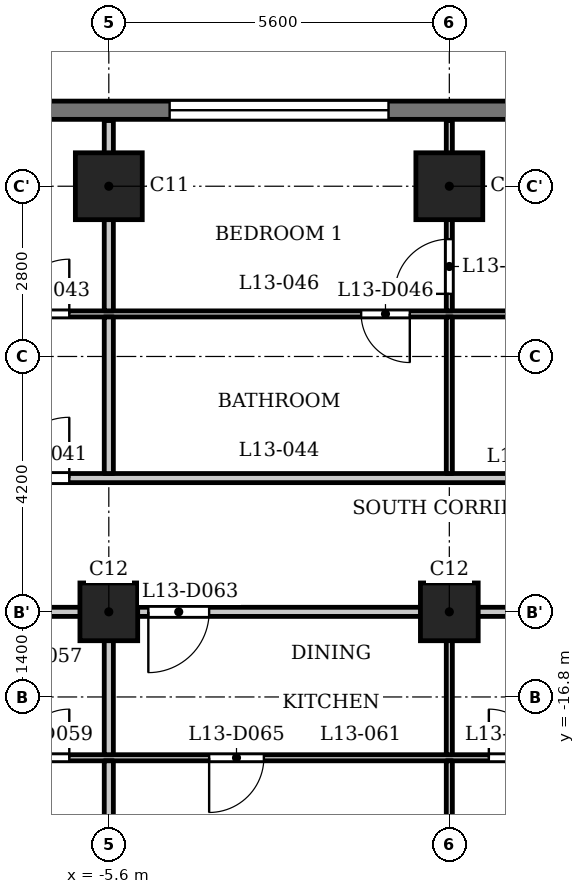
"""IFC4 building model, lengths in metres.
Left out: names, types, materials, properties, quantities, classifications, styles, units other than length and angle.
Written with IfcOpenShell. Run it as: python <this file> out.ifc"""

import sys

from ifc_helpers import new_model, si_unit, direction, frame, frame_2d, origin, origin_2d, place, context, subcontext, project, spatial, rectangle, extrude, element, fill, save


model = new_model("IFC4")
c1 = context("Model", 3, precision=1e-05, world=origin(), true_north=direction((0.0, 1.0)))
c2 = subcontext(c1, "Body", "Model", "MODEL_VIEW")
j1 = project(units=[si_unit("LENGTHUNIT", "METRE"), si_unit("PLANEANGLEUNIT", "RADIAN")], contexts=[c1])
p1 = place(None, origin())
s1 = spatial("IfcSite", under=j1, at=p1, CompositionType="ELEMENT")
p2 = place(p1, origin())
s2 = spatial("IfcBuilding", under=s1, at=p2, CompositionType="ELEMENT")
p3 = place(p2, frame((0.0, 0.0, 55.0)))
s3 = spatial("IfcBuildingStorey", under=s2, at=p3, CompositionType="ELEMENT", Elevation=55.0)
for number, where, z_axis, x_axis in (
    (1, (-5.6, -8.4, 0.0), (0.0, 0.0, 1.0), (1.0, 0.0, 0.0)),
    (2, (0.0, -8.4, 0.0), (0.0, 0.0, 1.0), (1.0, 0.0, 0.0)),
):
    element("IfcColumn", number, at=place(p3, frame(where, z_axis=z_axis, x_axis=x_axis)), inside=s3, PredefinedType="COLUMN", context=c2, shape_type="SweptSolid", body=[
        extrude(rectangle(XDim=1.1, YDim=1.1, at=origin_2d()), origin(), (0.0, 0.0, 1.0), 3.5),
    ])
for number, where, z_axis, x_axis in (
    (3, (-5.6, -15.4, 0.0), (0.0, 0.0, 1.0), (1.0, 0.0, 0.0)),
    (4, (0.0, -15.4, 0.0), (0.0, 0.0, 1.0), (1.0, 0.0, 0.0)),
):
    element("IfcColumn", number, at=place(p3, frame(where, z_axis=z_axis, x_axis=x_axis)), inside=s3, PredefinedType="COLUMN", context=c2, shape_type="SweptSolid", body=[
        extrude(rectangle(XDim=0.95, YDim=0.95, at=origin_2d()), origin(), (0.0, 0.0, 1.0), 3.5),
    ])
p4 = place(p3, frame((13.8, -7.15, 0.0), z_axis=(0.0, 0.0, 1.0), x_axis=(-1.0, 0.0, 0.0)))
e5 = element("IfcWall", 5, at=p4, inside=s3, PredefinedType="SOLIDWALL", context=c2, shape_type="SweptSolid", body=[
    extrude(rectangle(XDim=27.6, YDim=0.3, at=frame_2d((13.8, 0.0))), origin(), (0.0, 0.0, 1.0), 3.2),
])
p5 = place(p4, frame((0.363, 0.0, 0.9)))
e6 = element("IfcOpeningElement", 6, at=p5, cuts=e5, PredefinedType="OPENING", context=c2, shape_type="SweptSolid", body=[
    extrude(rectangle(XDim=1.8, YDim=1.25, at=frame_2d((0.9, 0.625))), frame((0.0, 0.16, 0.0), z_axis=(0.0, -1.0, 0.0), x_axis=(1.0, 0.0, 0.0)), (0.0, 0.0, 1.0), 0.32),
])
p6 = place(p4, frame((3.6, 0.0, 1.2)))
e7 = element("IfcOpeningElement", 7, at=p6, cuts=e5, PredefinedType="OPENING", context=c2, shape_type="SweptSolid", body=[
    extrude(rectangle(XDim=3.6, YDim=0.95, at=frame_2d((1.8, 0.475))), frame((0.0, 0.16, 0.0), z_axis=(0.0, -1.0, 0.0), x_axis=(1.0, 0.0, 0.0)), (0.0, 0.0, 1.0), 0.32),
])
p7 = place(p4, frame((9.2, 0.0, 1.2)))
e8 = element("IfcOpeningElement", 8, at=p7, cuts=e5, PredefinedType="OPENING", context=c2, shape_type="SweptSolid", body=[
    extrude(rectangle(XDim=3.6, YDim=0.95, at=frame_2d((1.8, 0.475))), frame((0.0, 0.16, 0.0), z_axis=(0.0, -1.0, 0.0), x_axis=(1.0, 0.0, 0.0)), (0.0, 0.0, 1.0), 0.32),
])
p8 = place(p4, frame((14.8, 0.0, 1.2)))
e9 = element("IfcOpeningElement", 9, at=p8, cuts=e5, PredefinedType="OPENING", context=c2, shape_type="SweptSolid", body=[
    extrude(rectangle(XDim=3.6, YDim=0.95, at=frame_2d((1.8, 0.475))), frame((0.0, 0.16, 0.0), z_axis=(0.0, -1.0, 0.0), x_axis=(1.0, 0.0, 0.0)), (0.0, 0.0, 1.0), 0.32),
])
p9 = place(p4, frame((20.4, 0.0, 1.2)))
e10 = element("IfcOpeningElement", 10, at=p9, cuts=e5, PredefinedType="OPENING", context=c2, shape_type="SweptSolid", body=[
    extrude(rectangle(XDim=3.6, YDim=0.95, at=frame_2d((1.8, 0.475))), frame((0.0, 0.16, 0.0), z_axis=(0.0, -1.0, 0.0), x_axis=(1.0, 0.0, 0.0)), (0.0, 0.0, 1.0), 0.32),
])
p10 = place(p4, frame((25.438, 0.0, 0.9)))
e11 = element("IfcOpeningElement", 11, at=p10, cuts=e5, PredefinedType="OPENING", context=c2, shape_type="SweptSolid", body=[
    extrude(rectangle(XDim=1.8, YDim=1.25, at=frame_2d((0.9, 0.625))), frame((0.0, 0.16, 0.0), z_axis=(0.0, -1.0, 0.0), x_axis=(1.0, 0.0, 0.0)), (0.0, 0.0, 1.0), 0.32),
])
p11 = place(p3, frame((-26.394, -17.8, 0.0), z_axis=(0.0, 0.0, 1.0), x_axis=(1.0, 0.0, 0.0)))
e12 = element("IfcWall", 12, at=p11, inside=s3, PredefinedType="PARTITIONING", context=c2, shape_type="SweptSolid", body=[
    extrude(rectangle(XDim=53.034, YDim=0.1, at=frame_2d((26.517, 0.0))), origin(), (0.0, 0.0, 1.0), 3.2),
])
p12 = place(p11, frame((0.794, 0.0, 0.0)))
e13 = element("IfcOpeningElement", 13, at=p12, cuts=e12, PredefinedType="OPENING", context=c2, shape_type="SweptSolid", body=[
    extrude(rectangle(XDim=0.8, YDim=2.1, at=frame_2d((0.4, 1.05))), frame((0.0, 0.06, 0.0), z_axis=(0.0, -1.0, 0.0), x_axis=(1.0, 0.0, 0.0)), (0.0, 0.0, 1.0), 0.12),
])
p13 = place(p11, frame((5.644, 0.0, 0.0)))
e14 = element("IfcOpeningElement", 14, at=p13, cuts=e12, PredefinedType="OPENING", context=c2, shape_type="SweptSolid", body=[
    extrude(rectangle(XDim=0.9, YDim=2.1, at=frame_2d((0.45, 1.05))), frame((0.0, 0.06, 0.0), z_axis=(0.0, -1.0, 0.0), x_axis=(1.0, 0.0, 0.0)), (0.0, 0.0, 1.0), 0.12),
])
p14 = place(p11, frame((19.344, 0.0, 0.0)))
e15 = element("IfcOpeningElement", 15, at=p14, cuts=e12, PredefinedType="OPENING", context=c2, shape_type="SweptSolid", body=[
    extrude(rectangle(XDim=0.8, YDim=2.1, at=frame_2d((0.4, 1.05))), frame((0.0, 0.06, 0.0), z_axis=(0.0, -1.0, 0.0), x_axis=(1.0, 0.0, 0.0)), (0.0, 0.0, 1.0), 0.12),
])
p15 = place(p11, frame((17.094, 0.0, 0.0)))
e16 = element("IfcOpeningElement", 16, at=p15, cuts=e12, PredefinedType="OPENING", context=c2, shape_type="SweptSolid", body=[
    extrude(rectangle(XDim=0.9, YDim=2.1, at=frame_2d((0.45, 1.05))), frame((0.0, 0.06, 0.0), z_axis=(0.0, -1.0, 0.0), x_axis=(1.0, 0.0, 0.0)), (0.0, 0.0, 1.0), 0.12),
])
p16 = place(p11, frame((10.494, 0.0, 0.0)))
e17 = element("IfcOpeningElement", 17, at=p16, cuts=e12, PredefinedType="OPENING", context=c2, shape_type="SweptSolid", body=[
    extrude(rectangle(XDim=0.9, YDim=2.1, at=frame_2d((0.45, 1.05))), frame((0.0, 0.06, 0.0), z_axis=(0.0, -1.0, 0.0), x_axis=(1.0, 0.0, 0.0)), (0.0, 0.0, 1.0), 0.12),
])
p17 = place(p11, frame((13.294, 0.0, 0.0)))
e18 = element("IfcOpeningElement", 18, at=p17, cuts=e12, PredefinedType="OPENING", context=c2, shape_type="SweptSolid", body=[
    extrude(rectangle(XDim=0.9, YDim=2.1, at=frame_2d((0.45, 1.05))), frame((0.0, 0.06, 0.0), z_axis=(0.0, -1.0, 0.0), x_axis=(1.0, 0.0, 0.0)), (0.0, 0.0, 1.0), 0.12),
])
p18 = place(p11, frame((27.044, 0.0, 0.0)))
e19 = element("IfcOpeningElement", 19, at=p18, cuts=e12, PredefinedType="OPENING", context=c2, shape_type="SweptSolid", body=[
    extrude(rectangle(XDim=0.8, YDim=2.1, at=frame_2d((0.4, 1.05))), frame((0.0, 0.06, 0.0), z_axis=(0.0, -1.0, 0.0), x_axis=(1.0, 0.0, 0.0)), (0.0, 0.0, 1.0), 0.12),
])
p19 = place(p11, frame((22.444, 0.0, 0.0)))
e20 = element("IfcOpeningElement", 20, at=p19, cuts=e12, PredefinedType="OPENING", context=c2, shape_type="SweptSolid", body=[
    extrude(rectangle(XDim=0.9, YDim=2.1, at=frame_2d((0.45, 1.05))), frame((0.0, 0.06, 0.0), z_axis=(0.0, -1.0, 0.0), x_axis=(1.0, 0.0, 0.0)), (0.0, 0.0, 1.0), 0.12),
])
p20 = place(p11, frame((36.144, 0.0, 0.0)))
e21 = element("IfcOpeningElement", 21, at=p20, cuts=e12, PredefinedType="OPENING", context=c2, shape_type="SweptSolid", body=[
    extrude(rectangle(XDim=0.8, YDim=2.1, at=frame_2d((0.4, 1.05))), frame((0.0, 0.06, 0.0), z_axis=(0.0, -1.0, 0.0), x_axis=(1.0, 0.0, 0.0)), (0.0, 0.0, 1.0), 0.12),
])
p21 = place(p11, frame((33.644, 0.0, 0.0)))
e22 = element("IfcOpeningElement", 22, at=p21, cuts=e12, PredefinedType="OPENING", context=c2, shape_type="SweptSolid", body=[
    extrude(rectangle(XDim=0.9, YDim=2.1, at=frame_2d((0.45, 1.05))), frame((0.0, 0.06, 0.0), z_axis=(0.0, -1.0, 0.0), x_axis=(1.0, 0.0, 0.0)), (0.0, 0.0, 1.0), 0.12),
])
p22 = place(p11, frame((39.144, 0.0, 0.0)))
e23 = element("IfcOpeningElement", 23, at=p22, cuts=e12, PredefinedType="OPENING", context=c2, shape_type="SweptSolid", body=[
    extrude(rectangle(XDim=0.8, YDim=2.1, at=frame_2d((0.4, 1.05))), frame((0.0, 0.06, 0.0), z_axis=(0.0, -1.0, 0.0), x_axis=(1.0, 0.0, 0.0)), (0.0, 0.0, 1.0), 0.12),
])
p23 = place(p11, frame((41.494, 0.0, 0.0)))
e24 = element("IfcOpeningElement", 24, at=p23, cuts=e12, PredefinedType="OPENING", context=c2, shape_type="SweptSolid", body=[
    extrude(rectangle(XDim=0.9, YDim=2.1, at=frame_2d((0.45, 1.05))), frame((0.0, 0.06, 0.0), z_axis=(0.0, -1.0, 0.0), x_axis=(1.0, 0.0, 0.0)), (0.0, 0.0, 1.0), 0.12),
])
p24 = place(p11, frame((49.362, 0.0, 0.0)))
e25 = element("IfcOpeningElement", 25, at=p24, cuts=e12, PredefinedType="OPENING", context=c2, shape_type="SweptSolid", body=[
    extrude(rectangle(XDim=0.8, YDim=2.1, at=frame_2d((0.4, 1.05))), frame((0.0, 0.06, 0.0), z_axis=(0.0, -1.0, 0.0), x_axis=(1.0, 0.0, 0.0)), (0.0, 0.0, 1.0), 0.12),
])
p25 = place(p11, frame((45.094, 0.0, 0.0)))
e26 = element("IfcOpeningElement", 26, at=p25, cuts=e12, PredefinedType="OPENING", context=c2, shape_type="SweptSolid", body=[
    extrude(rectangle(XDim=0.9, YDim=2.1, at=frame_2d((0.45, 1.05))), frame((0.0, 0.06, 0.0), z_axis=(0.0, -1.0, 0.0), x_axis=(1.0, 0.0, 0.0)), (0.0, 0.0, 1.0), 0.12),
])
p26 = place(p3, frame((-27.484, -15.4, 0.0), z_axis=(0.0, 0.0, 1.0), x_axis=(1.0, 0.0, 0.0)))
e27 = element("IfcWall", 27, at=p26, inside=s3, PredefinedType="PARTITIONING", context=c2, shape_type="SweptSolid", body=[
    extrude(rectangle(XDim=54.968, YDim=0.15, at=frame_2d((27.484, 0.0))), origin(), (0.0, 0.0, 1.0), 3.2),
])
p27 = place(p26, frame((5.734, 0.0, 0.0)))
e28 = element("IfcOpeningElement", 28, at=p27, cuts=e27, PredefinedType="OPENING", context=c2, shape_type="SweptSolid", body=[
    extrude(rectangle(XDim=1.0, YDim=2.1, at=frame_2d((0.5, 1.05))), frame((0.0, 0.085, 0.0), z_axis=(0.0, -1.0, 0.0), x_axis=(1.0, 0.0, 0.0)), (0.0, 0.0, 1.0), 0.17),
])
p28 = place(p26, frame((11.584, 0.0, 0.0)))
e29 = element("IfcOpeningElement", 29, at=p28, cuts=e27, PredefinedType="OPENING", context=c2, shape_type="SweptSolid", body=[
    extrude(rectangle(XDim=1.0, YDim=2.1, at=frame_2d((0.5, 1.05))), frame((0.0, 0.085, 0.0), z_axis=(0.0, -1.0, 0.0), x_axis=(1.0, 0.0, 0.0)), (0.0, 0.0, 1.0), 0.17),
])
p29 = place(p26, frame((22.534, 0.0, 0.0)))
e30 = element("IfcOpeningElement", 30, at=p29, cuts=e27, PredefinedType="OPENING", context=c2, shape_type="SweptSolid", body=[
    extrude(rectangle(XDim=1.0, YDim=2.1, at=frame_2d((0.5, 1.05))), frame((0.0, 0.085, 0.0), z_axis=(0.0, -1.0, 0.0), x_axis=(1.0, 0.0, 0.0)), (0.0, 0.0, 1.0), 0.17),
])
p30 = place(p26, frame((33.734, 0.0, 0.0)))
e31 = element("IfcOpeningElement", 31, at=p30, cuts=e27, PredefinedType="OPENING", context=c2, shape_type="SweptSolid", body=[
    extrude(rectangle(XDim=1.0, YDim=2.1, at=frame_2d((0.5, 1.05))), frame((0.0, 0.085, 0.0), z_axis=(0.0, -1.0, 0.0), x_axis=(1.0, 0.0, 0.0)), (0.0, 0.0, 1.0), 0.17),
])
p31 = place(p26, frame((42.334, 0.0, 0.0)))
e32 = element("IfcOpeningElement", 32, at=p31, cuts=e27, PredefinedType="OPENING", context=c2, shape_type="SweptSolid", body=[
    extrude(rectangle(XDim=1.0, YDim=2.1, at=frame_2d((0.5, 1.05))), frame((0.0, 0.085, 0.0), z_axis=(0.0, -1.0, 0.0), x_axis=(1.0, 0.0, 0.0)), (0.0, 0.0, 1.0), 0.17),
])
p32 = place(p26, frame((45.184, 0.0, 0.0)))
e33 = element("IfcOpeningElement", 33, at=p32, cuts=e27, PredefinedType="OPENING", context=c2, shape_type="SweptSolid", body=[
    extrude(rectangle(XDim=1.0, YDim=2.1, at=frame_2d((0.5, 1.05))), frame((0.0, 0.085, 0.0), z_axis=(0.0, -1.0, 0.0), x_axis=(1.0, 0.0, 0.0)), (0.0, 0.0, 1.0), 0.17),
])
p33 = place(p3, frame((-17.4, -13.2, 0.0), z_axis=(0.0, 0.0, 1.0), x_axis=(1.0, 0.0, 0.0)))
e34 = element("IfcWall", 34, at=p33, inside=s3, PredefinedType="PARTITIONING", context=c2, shape_type="SweptSolid", body=[
    extrude(rectangle(XDim=34.8, YDim=0.15, at=frame_2d((17.4, 0.0))), origin(), (0.0, 0.0, 1.0), 3.2),
])
p34 = place(p33, frame((0.65, 0.0, 0.0)))
e35 = element("IfcOpeningElement", 35, at=p34, cuts=e34, PredefinedType="OPENING", context=c2, shape_type="SweptSolid", body=[
    extrude(rectangle(XDim=1.0, YDim=2.1, at=frame_2d((0.5, 1.05))), frame((0.0, 0.085, 0.0), z_axis=(0.0, -1.0, 0.0), x_axis=(1.0, 0.0, 0.0)), (0.0, 0.0, 1.0), 0.17),
])
p35 = place(p33, frame((33.05, 0.0, 0.0)))
e36 = element("IfcOpeningElement", 36, at=p35, cuts=e34, PredefinedType="OPENING", context=c2, shape_type="SweptSolid", body=[
    extrude(rectangle(XDim=1.0, YDim=2.1, at=frame_2d((0.5, 1.05))), frame((0.0, 0.085, 0.0), z_axis=(0.0, -1.0, 0.0), x_axis=(1.0, 0.0, 0.0)), (0.0, 0.0, 1.0), 0.17),
])
p36 = place(p33, frame((10.15, 0.0, 0.0)))
e37 = element("IfcOpeningElement", 37, at=p36, cuts=e34, PredefinedType="OPENING", context=c2, shape_type="SweptSolid", body=[
    extrude(rectangle(XDim=1.0, YDim=2.1, at=frame_2d((0.5, 1.05))), frame((0.0, 0.085, 0.0), z_axis=(0.0, -1.0, 0.0), x_axis=(1.0, 0.0, 0.0)), (0.0, 0.0, 1.0), 0.17),
])
p37 = place(p33, frame((21.35, 0.0, 0.0)))
e38 = element("IfcOpeningElement", 38, at=p37, cuts=e34, PredefinedType="OPENING", context=c2, shape_type="SweptSolid", body=[
    extrude(rectangle(XDim=1.0, YDim=2.1, at=frame_2d((0.5, 1.05))), frame((0.0, 0.085, 0.0), z_axis=(0.0, -1.0, 0.0), x_axis=(1.0, 0.0, 0.0)), (0.0, 0.0, 1.0), 0.17),
])
p38 = place(p33, frame((30.75, 0.0, 0.0)))
e39 = element("IfcOpeningElement", 39, at=p38, cuts=e34, PredefinedType="OPENING", context=c2, shape_type="SweptSolid", body=[
    extrude(rectangle(XDim=1.0, YDim=2.1, at=frame_2d((0.5, 1.05))), frame((0.0, 0.085, 0.0), z_axis=(0.0, -1.0, 0.0), x_axis=(1.0, 0.0, 0.0)), (0.0, 0.0, 1.0), 0.17),
])
p39 = place(p3, frame((-14.925, -10.5, 0.0), z_axis=(0.0, 0.0, 1.0), x_axis=(1.0, 0.0, 0.0)))
e40 = element("IfcWall", 40, at=p39, inside=s3, PredefinedType="PARTITIONING", context=c2, shape_type="SweptSolid", body=[
    extrude(rectangle(XDim=29.85, YDim=0.1, at=frame_2d((14.925, 0.0))), origin(), (0.0, 0.0, 1.0), 3.2),
])
p40 = place(p39, frame((2.325, 0.0, 0.0)))
e41 = element("IfcOpeningElement", 41, at=p40, cuts=e40, PredefinedType="OPENING", context=c2, shape_type="SweptSolid", body=[
    extrude(rectangle(XDim=0.8, YDim=2.1, at=frame_2d((0.4, 1.05))), frame((0.0, 0.06, 0.0), z_axis=(0.0, -1.0, 0.0), x_axis=(1.0, 0.0, 0.0)), (0.0, 0.0, 1.0), 0.12),
])
p41 = place(p39, frame((7.775, 0.0, 0.0)))
e42 = element("IfcOpeningElement", 42, at=p41, cuts=e40, PredefinedType="OPENING", context=c2, shape_type="SweptSolid", body=[
    extrude(rectangle(XDim=0.9, YDim=2.1, at=frame_2d((0.45, 1.05))), frame((0.0, 0.06, 0.0), z_axis=(0.0, -1.0, 0.0), x_axis=(1.0, 0.0, 0.0)), (0.0, 0.0, 1.0), 0.12),
])
p42 = place(p39, frame((13.475, 0.0, 0.0)))
e43 = element("IfcOpeningElement", 43, at=p42, cuts=e40, PredefinedType="OPENING", context=c2, shape_type="SweptSolid", body=[
    extrude(rectangle(XDim=0.8, YDim=2.1, at=frame_2d((0.4, 1.05))), frame((0.0, 0.06, 0.0), z_axis=(0.0, -1.0, 0.0), x_axis=(1.0, 0.0, 0.0)), (0.0, 0.0, 1.0), 0.12),
])
p43 = place(p39, frame((18.975, 0.0, 0.0)))
e44 = element("IfcOpeningElement", 44, at=p43, cuts=e40, PredefinedType="OPENING", context=c2, shape_type="SweptSolid", body=[
    extrude(rectangle(XDim=0.9, YDim=2.1, at=frame_2d((0.45, 1.05))), frame((0.0, 0.06, 0.0), z_axis=(0.0, -1.0, 0.0), x_axis=(1.0, 0.0, 0.0)), (0.0, 0.0, 1.0), 0.12),
])
p44 = place(p39, frame((24.675, 0.0, 0.0)))
e45 = element("IfcOpeningElement", 45, at=p44, cuts=e40, PredefinedType="OPENING", context=c2, shape_type="SweptSolid", body=[
    extrude(rectangle(XDim=0.8, YDim=2.1, at=frame_2d((0.4, 1.05))), frame((0.0, 0.06, 0.0), z_axis=(0.0, -1.0, 0.0), x_axis=(1.0, 0.0, 0.0)), (0.0, 0.0, 1.0), 0.12),
])
p45 = place(p39, frame((28.375, 0.0, 0.0)))
e46 = element("IfcOpeningElement", 46, at=p45, cuts=e40, PredefinedType="OPENING", context=c2, shape_type="SweptSolid", body=[
    extrude(rectangle(XDim=0.9, YDim=2.1, at=frame_2d((0.45, 1.05))), frame((0.0, 0.06, 0.0), z_axis=(0.0, -1.0, 0.0), x_axis=(1.0, 0.0, 0.0)), (0.0, 0.0, 1.0), 0.12),
])
p46 = place(p3, frame((-5.6, -23.08, 0.0), z_axis=(0.0, 0.0, 1.0), x_axis=(0.0, 1.0, 0.0)))
e47 = element("IfcWall", 47, at=p46, inside=s3, PredefinedType="PARTITIONING", context=c2, shape_type="SweptSolid", body=[
    extrude(rectangle(XDim=5.23, YDim=0.15, at=frame_2d((2.615, 0.0))), origin(), (0.0, 0.0, 1.0), 3.2),
])
p47 = place(p3, frame((-5.6, -17.75, 0.0), z_axis=(0.0, 0.0, 1.0), x_axis=(0.0, 1.0, 0.0)))
e48 = element("IfcWall", 48, at=p47, inside=s3, PredefinedType="PARTITIONING", context=c2, shape_type="SweptSolid", body=[
    extrude(rectangle(XDim=2.275, YDim=0.15, at=frame_2d((1.137, 0.0))), origin(), (0.0, 0.0, 1.0), 3.2),
])
p48 = place(p3, frame((-5.6, -13.125, 0.0), z_axis=(0.0, 0.0, 1.0), x_axis=(0.0, 1.0, 0.0)))
e49 = element("IfcWall", 49, at=p48, inside=s3, PredefinedType="PARTITIONING", context=c2, shape_type="SweptSolid", body=[
    extrude(rectangle(XDim=2.575, YDim=0.15, at=frame_2d((1.288, 0.0))), origin(), (0.0, 0.0, 1.0), 3.2),
])
p49 = place(p3, frame((-5.6, -10.45, 0.0), z_axis=(0.0, 0.0, 1.0), x_axis=(0.0, 1.0, 0.0)))
e50 = element("IfcWall", 50, at=p49, inside=s3, PredefinedType="PARTITIONING", context=c2, shape_type="SweptSolid", body=[
    extrude(rectangle(XDim=3.13, YDim=0.15, at=frame_2d((1.565, 0.0))), origin(), (0.0, 0.0, 1.0), 3.2),
])
p50 = place(p3, frame((0.0, -23.08, 0.0), z_axis=(0.0, 0.0, 1.0), x_axis=(0.0, 1.0, 0.0)))
e51 = element("IfcWall", 51, at=p50, inside=s3, PredefinedType="PARTITIONING", context=c2, shape_type="SweptSolid", body=[
    extrude(rectangle(XDim=5.23, YDim=0.1, at=frame_2d((2.615, 0.0))), origin(), (0.0, 0.0, 1.0), 3.2),
])
p51 = place(p50, frame((2.92, 0.0, 0.0)))
e52 = element("IfcOpeningElement", 52, at=p51, cuts=e51, PredefinedType="OPENING", context=c2, shape_type="SweptSolid", body=[
    extrude(rectangle(XDim=0.9, YDim=2.1, at=frame_2d((0.45, 1.05))), frame((0.0, 0.06, 0.0), z_axis=(0.0, -1.0, 0.0), x_axis=(1.0, 0.0, 0.0)), (0.0, 0.0, 1.0), 0.12),
])
p52 = place(p3, frame((0.0, -17.75, 0.0), z_axis=(0.0, 0.0, 1.0), x_axis=(0.0, 1.0, 0.0)))
e53 = element("IfcWall", 53, at=p52, inside=s3, PredefinedType="PARTITIONING", context=c2, shape_type="SweptSolid", body=[
    extrude(rectangle(XDim=2.275, YDim=0.1, at=frame_2d((1.137, 0.0))), origin(), (0.0, 0.0, 1.0), 3.2),
])
p53 = place(p3, frame((0.0, -13.125, 0.0), z_axis=(0.0, 0.0, 1.0), x_axis=(0.0, 1.0, 0.0)))
e54 = element("IfcWall", 54, at=p53, inside=s3, PredefinedType="PARTITIONING", context=c2, shape_type="SweptSolid", body=[
    extrude(rectangle(XDim=2.575, YDim=0.1, at=frame_2d((1.288, 0.0))), origin(), (0.0, 0.0, 1.0), 3.2),
])
p54 = place(p3, frame((0.0, -10.45, 0.0), z_axis=(0.0, 0.0, 1.0), x_axis=(0.0, 1.0, 0.0)))
e55 = element("IfcWall", 55, at=p54, inside=s3, PredefinedType="PARTITIONING", context=c2, shape_type="SweptSolid", body=[
    extrude(rectangle(XDim=3.13, YDim=0.1, at=frame_2d((1.565, 0.0))), origin(), (0.0, 0.0, 1.0), 3.2),
])
p55 = place(p54, frame((0.28, 0.0, 0.0)))
e56 = element("IfcOpeningElement", 56, at=p55, cuts=e55, PredefinedType="OPENING", context=c2, shape_type="SweptSolid", body=[
    extrude(rectangle(XDim=0.9, YDim=2.1, at=frame_2d((0.45, 1.05))), frame((0.0, 0.06, 0.0), z_axis=(0.0, -1.0, 0.0), x_axis=(1.0, 0.0, 0.0)), (0.0, 0.0, 1.0), 0.12),
])
p56 = place(p36, origin())
e57 = element("IfcDoor", 57, at=p56, inside=s3, OperationType="SINGLE_SWING_LEFT", PredefinedType="DOOR", context=c2, shape_type="SweptSolid", body=[
    extrude(rectangle(XDim=1.0, YDim=2.1, at=frame_2d((0.5, 1.05))), frame((0.0, 0.025, 0.0), z_axis=(0.0, -1.0, 0.0), x_axis=(1.0, 0.0, 0.0)), (0.0, 0.0, 1.0), 0.05),
])
fill(e37, e57)
p57 = place(p41, origin())
e58 = element("IfcDoor", 58, at=p57, inside=s3, OperationType="SINGLE_SWING_LEFT", PredefinedType="DOOR", context=c2, shape_type="SweptSolid", body=[
    extrude(rectangle(XDim=0.9, YDim=2.1, at=frame_2d((0.45, 1.05))), frame((0.0, 0.025, 0.0), z_axis=(0.0, -1.0, 0.0), x_axis=(1.0, 0.0, 0.0)), (0.0, 0.0, 1.0), 0.05),
])
fill(e42, e58)
p58 = place(p42, origin())
e59 = element("IfcDoor", 59, at=p58, inside=s3, OperationType="SINGLE_SWING_RIGHT", PredefinedType="DOOR", context=c2, shape_type="SweptSolid", body=[
    extrude(rectangle(XDim=0.8, YDim=2.1, at=frame_2d((0.4, 1.05))), frame((0.0, 0.025, 0.0), z_axis=(0.0, -1.0, 0.0), x_axis=(1.0, 0.0, 0.0)), (0.0, 0.0, 1.0), 0.05),
])
fill(e43, e59)
p59 = place(p55, origin())
e60 = element("IfcDoor", 60, at=p59, inside=s3, OperationType="SINGLE_SWING_RIGHT", PredefinedType="DOOR", context=c2, shape_type="SweptSolid", body=[
    extrude(rectangle(XDim=0.9, YDim=2.1, at=frame_2d((0.45, 1.05))), frame((0.0, 0.025, 0.0), z_axis=(0.0, -1.0, 0.0), x_axis=(1.0, 0.0, 0.0)), (0.0, 0.0, 1.0), 0.05),
])
fill(e56, e60)
p60 = place(p14, origin())
e61 = element("IfcDoor", 61, at=p60, inside=s3, OperationType="SINGLE_SWING_LEFT", PredefinedType="DOOR", context=c2, shape_type="SweptSolid", body=[
    extrude(rectangle(XDim=0.8, YDim=2.1, at=frame_2d((0.4, 1.05))), frame((0.0, 0.025, 0.0), z_axis=(0.0, -1.0, 0.0), x_axis=(1.0, 0.0, 0.0)), (0.0, 0.0, 1.0), 0.05),
])
fill(e15, e61)
p61 = place(p29, origin())
e62 = element("IfcDoor", 62, at=p61, inside=s3, OperationType="SINGLE_SWING_LEFT", PredefinedType="DOOR", context=c2, shape_type="SweptSolid", body=[
    extrude(rectangle(XDim=1.0, YDim=2.1, at=frame_2d((0.5, 1.05))), frame((0.0, 0.025, 0.0), z_axis=(0.0, -1.0, 0.0), x_axis=(1.0, 0.0, 0.0)), (0.0, 0.0, 1.0), 0.05),
])
fill(e30, e62)
p62 = place(p18, origin())
e63 = element("IfcDoor", 63, at=p62, inside=s3, OperationType="SINGLE_SWING_RIGHT", PredefinedType="DOOR", context=c2, shape_type="SweptSolid", body=[
    extrude(rectangle(XDim=0.8, YDim=2.1, at=frame_2d((0.4, 1.05))), frame((0.0, 0.025, 0.0), z_axis=(0.0, -1.0, 0.0), x_axis=(1.0, 0.0, 0.0)), (0.0, 0.0, 1.0), 0.05),
])
fill(e19, e63)
p63 = place(p19, origin())
e64 = element("IfcDoor", 64, at=p63, inside=s3, OperationType="SINGLE_SWING_LEFT", PredefinedType="DOOR", context=c2, shape_type="SweptSolid", body=[
    extrude(rectangle(XDim=0.9, YDim=2.1, at=frame_2d((0.45, 1.05))), frame((0.0, 0.025, 0.0), z_axis=(0.0, -1.0, 0.0), x_axis=(1.0, 0.0, 0.0)), (0.0, 0.0, 1.0), 0.05),
])
fill(e20, e64)
p64 = place(p8, origin())
e65 = element("IfcWindow", 65, at=p64, inside=s3, PartitioningType="SINGLE_PANEL", PredefinedType="WINDOW", context=c2, shape_type="SweptSolid", body=[
    extrude(rectangle(XDim=3.6, YDim=0.95, at=frame_2d((1.8, 0.475))), frame((0.0, 0.03, 0.0), z_axis=(0.0, -1.0, 0.0), x_axis=(1.0, 0.0, 0.0)), (0.0, 0.0, 1.0), 0.06),
])
fill(e9, e65)
save(model, sys.argv[1])
